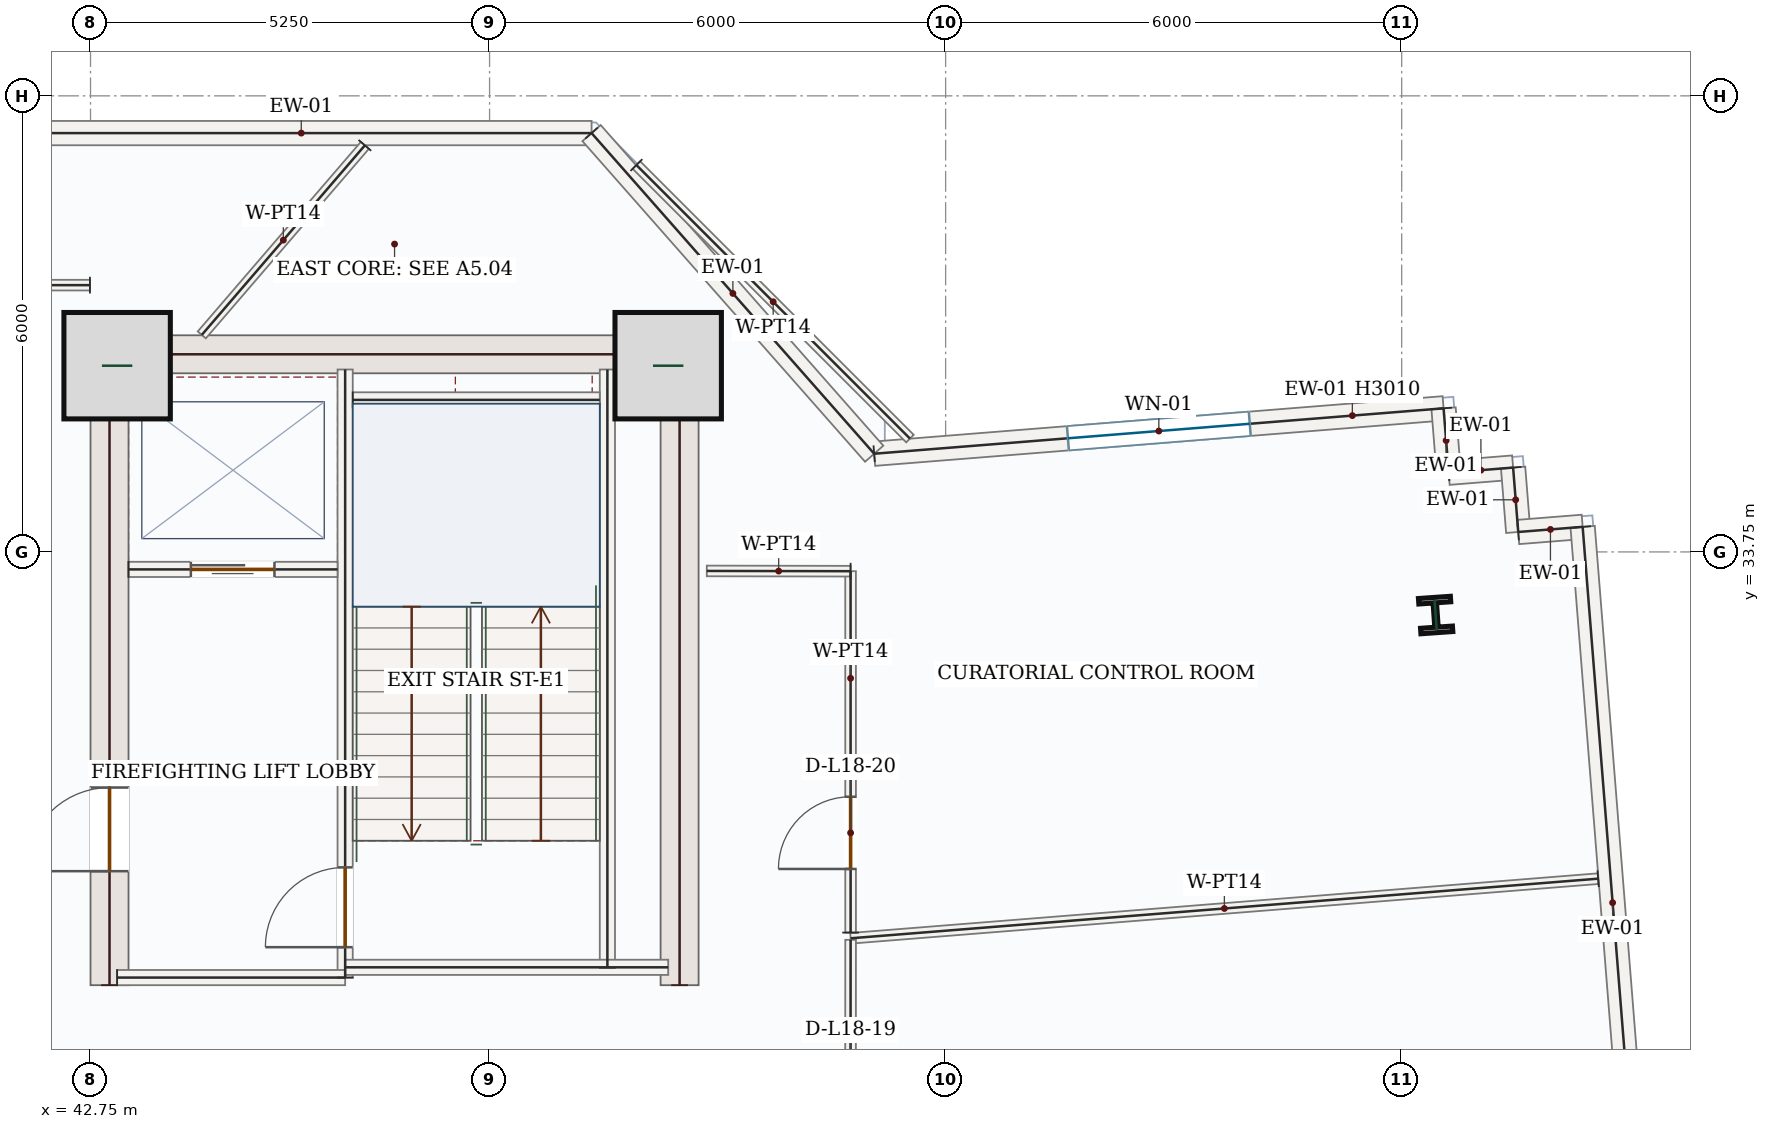
"""IFC4 building model, lengths in metres.
Left out: names, types, materials, properties, quantities, classifications, styles, units other than length and angle.
Written with IfcOpenShell. Run it as: python <this file> out.ifc"""

import sys

from ifc_helpers import new_model, si_unit, direction, frame, frame_2d, origin, origin_2d, place, context, subcontext, project, spatial, rectangle, i_section, extrude, source, transform, mapped, element, fill, save


model = new_model("IFC4")
c1 = context("Model", 3, precision=1e-05, world=origin(), true_north=direction((0.0, 1.0)))
c2 = subcontext(c1, "Body", "Model", "MODEL_VIEW")
j1 = project(units=[si_unit("LENGTHUNIT", "METRE"), si_unit("PLANEANGLEUNIT", "RADIAN")], contexts=[c1])
p1 = place(None, origin())
s1 = spatial("IfcSite", under=j1, at=p1, CompositionType="ELEMENT")
p2 = place(p1, origin())
s2 = spatial("IfcBuilding", under=s1, at=p2, CompositionType="ELEMENT")
p3 = place(p2, frame((0.0, 0.0, 83.7)))
s3 = spatial("IfcBuildingStorey", under=s2, at=p3, CompositionType="ELEMENT", Elevation=83.7)
p4 = place(p3, frame((43.0, 28.05, 0.0), z_axis=(0.0, 0.0, 1.0), x_axis=(0.0, 1.0, 0.0)))
e1 = element("IfcWall", 1, at=p4, inside=s3, PredefinedType="SHEAR", context=c2, shape_type="SweptSolid", body=[
    extrude(rectangle(XDim=8.55, YDim=0.5, at=frame_2d((4.275, 0.0))), origin(), (0.0, 0.0, 1.0), 3.95),
])
p5 = place(p4, frame((1.5, 0.0, 0.0)))
e2 = element("IfcOpeningElement", 2, at=p5, cuts=e1, PredefinedType="OPENING", context=c2, shape_type="SweptSolid", body=[
    extrude(rectangle(XDim=1.1, YDim=2.2, at=frame_2d((0.55, 1.1))), frame((0.0, 0.26, 0.0), z_axis=(0.0, -1.0, 0.0), x_axis=(1.0, 0.0, 0.0)), (0.0, 0.0, 1.0), 0.52),
])
m1 = source(origin(), c2, "Body", "SweptSolid", [
    extrude(rectangle(XDim=8.55, YDim=0.5, at=frame_2d((4.275, 0.0))), origin(), (0.0, 0.0, 1.0), 3.95),
])
p6 = place(p3, frame((50.5, 28.05, 0.0), z_axis=(0.0, 0.0, 1.0), x_axis=(0.0, 1.0, 0.0)))
e3 = element("IfcWall", 3, at=p6, inside=s3, PredefinedType="SHEAR", context=c2, shape_type="MappedRepresentation", body=[
    mapped(m1, transform((0.0, 0.0, 0.0), x_axis=(1.0, 0.0, 0.0), y_axis=(0.0, 1.0, 0.0), z_axis=(0.0, 0.0, 1.0), scale=1.0)),
])
m2 = source(origin(), c2, "Body", "SweptSolid", [
    extrude(rectangle(XDim=7.0, YDim=0.5, at=frame_2d((3.5, 0.0))), origin(), (0.0, 0.0, 1.0), 3.95),
])
p7 = place(p3, frame((43.25, 36.35, 0.0), z_axis=(0.0, 0.0, 1.0), x_axis=(1.0, 0.0, 0.0)))
e4 = element("IfcWall", 4, at=p7, inside=s3, PredefinedType="SHEAR", context=c2, shape_type="MappedRepresentation", body=[
    mapped(m2, transform((0.0, 0.0, 0.0), x_axis=(1.0, 0.0, 0.0), y_axis=(0.0, 1.0, 0.0), z_axis=(0.0, 0.0, 1.0), scale=1.0)),
])
m3 = source(origin(), c2, "Body", "SweptSolid", [
    extrude(rectangle(XDim=1.4, YDim=1.4, at=origin_2d()), origin(), (0.0, 0.0, 1.0), 4.2),
])
for number, where, z_axis, x_axis in (
    (5, (43.1, 36.2, 0.0), (0.0, 0.0, 1.0), (1.0, 0.0, 0.0)),
    (6, (50.35, 36.2, 0.0), (0.0, 0.0, 1.0), (1.0, 0.0, 0.0)),
):
    element("IfcColumn", number, at=place(p3, frame(where, z_axis=z_axis, x_axis=x_axis)), inside=s3, PredefinedType="COLUMN", context=c2, shape_type="MappedRepresentation", body=[
        mapped(m3, transform((0.0, 0.0, 0.0), x_axis=(1.0, 0.0, 0.0), y_axis=(0.0, 1.0, 0.0), z_axis=(0.0, 0.0, 1.0), scale=1.0)),
    ])
m4 = source(origin(), c2, "Body", "SweptSolid", [
    extrude(i_section(OverallWidth=0.421, OverallDepth=0.465, WebThickness=0.045, FlangeThickness=0.073, FilletRadius=0.018, at=origin_2d()), origin(), (0.0, 0.0, 1.0), 4.2),
])
p8 = place(p3, frame((60.447, 32.92, 0.0), z_axis=(0.0, 0.0, 1.0), x_axis=(0.99756405026, 0.069756473744, 0.0)))
e7 = element("IfcColumn", 7, at=p8, inside=s3, PredefinedType="COLUMN", context=c2, shape_type="MappedRepresentation", body=[
    mapped(m4, transform((0.0, 0.0, 0.0), x_axis=(1.0, 0.0, 0.0), y_axis=(0.0, 1.0, 0.0), z_axis=(0.0, 0.0, 1.0), scale=1.0)),
])
p9 = place(p3, frame((53.06, 35.042, 0.0), z_axis=(0.0, 0.0, 1.0), x_axis=(0.996834773193, 0.079501163223, 0.0)))
e8 = element("IfcWall", 8, at=p9, inside=s3, PredefinedType="SOLIDWALL", context=c2, shape_type="SweptSolid", body=[
    extrude(rectangle(XDim=7.514, YDim=0.32, at=frame_2d((3.757, 0.0))), origin(), (0.0, 0.0, 1.0), 3.01),
])
p10 = place(p9, frame((2.557, 0.0, 0.85)))
e9 = element("IfcOpeningElement", 9, at=p10, cuts=e8, PredefinedType="OPENING", context=c2, shape_type="SweptSolid", body=[
    extrude(rectangle(XDim=2.4, YDim=1.8, at=frame_2d((1.2, 0.9))), frame((0.0, 0.17, 0.0), z_axis=(0.0, -1.0, 0.0), x_axis=(1.0, 0.0, 0.0)), (0.0, 0.0, 1.0), 0.34),
])
m5 = source(origin(), c2, "Body", "SweptSolid", [
    extrude(rectangle(XDim=0.85, YDim=0.32, at=frame_2d((0.425, 0.0))), origin(), (0.0, 0.0, 1.0), 3.95),
])
p11 = place(p3, frame((60.551, 35.639, 0.0), z_axis=(0.0, 0.0, 1.0), x_axis=(0.079573954853, -0.996828965123, 0.0)))
e10 = element("IfcWall", 10, at=p11, inside=s3, PredefinedType="SOLIDWALL", context=c2, shape_type="MappedRepresentation", body=[
    mapped(m5, transform((0.0, 0.0, 0.0), x_axis=(1.0, 0.0, 0.0), y_axis=(0.0, 1.0, 0.0), z_axis=(0.0, 0.0, 1.0), scale=1.0)),
])
m6 = source(origin(), c2, "Body", "SweptSolid", [
    extrude(rectangle(XDim=0.85, YDim=0.32, at=frame_2d((0.425, 0.0))), origin(), (0.0, 0.0, 1.0), 3.95),
])
for number, where, z_axis, x_axis in (
    (11, (60.618, 34.792, 0.0), (0.0, 0.0, 1.0), (0.997, 0.08, 0.0)),
    (12, (61.466, 34.86, 0.0), (0.0, 0.0, 1.0), (0.08, -0.997, 0.0)),
):
    element("IfcWall", number, at=place(p3, frame(where, z_axis=z_axis, x_axis=x_axis)), inside=s3, PredefinedType="SOLIDWALL", context=c2, shape_type="MappedRepresentation", body=[
        mapped(m6, transform((0.0, 0.0, 0.0), x_axis=(1.0, 0.0, 0.0), y_axis=(0.0, 1.0, 0.0), z_axis=(0.0, 0.0, 1.0), scale=1.0)),
    ])
p12 = place(p3, frame((61.533, 34.012, 0.0), z_axis=(0.0, 0.0, 1.0), x_axis=(0.996851711541, 0.079288493483, 0.0)))
e13 = element("IfcWall", 13, at=p12, inside=s3, PredefinedType="SOLIDWALL", context=c2, shape_type="MappedRepresentation", body=[
    mapped(m5, transform((0.0, 0.0, 0.0), x_axis=(1.0, 0.0, 0.0), y_axis=(0.0, 1.0, 0.0), z_axis=(0.0, 0.0, 1.0), scale=1.0)),
])
m7 = source(origin(), c2, "Body", "SweptSolid", [
    extrude(rectangle(XDim=9.92, YDim=0.32, at=frame_2d((4.96, 0.0))), origin(), (0.0, 0.0, 1.0), 3.95),
])
p13 = place(p3, frame((62.381, 34.08, 0.0), z_axis=(0.0, 0.0, 1.0), x_axis=(0.07949480177, -0.996835280521, 0.0)))
e14 = element("IfcWall", 14, at=p13, inside=s3, PredefinedType="SOLIDWALL", context=c2, shape_type="MappedRepresentation", body=[
    mapped(m7, transform((0.0, 0.0, 0.0), x_axis=(1.0, 0.0, 0.0), y_axis=(0.0, 1.0, 0.0), z_axis=(0.0, 0.0, 1.0), scale=1.0)),
])
m8 = source(origin(), c2, "Body", "SweptSolid", [
    extrude(rectangle(XDim=7.639, YDim=0.32, at=frame_2d((3.819, 0.0))), origin(), (0.0, 0.0, 1.0), 3.95),
])
p14 = place(p3, frame((41.703, 39.26, 0.0), z_axis=(0.0, 0.0, 1.0), x_axis=(1.0, 0.0, 0.0)))
e15 = element("IfcWall", 15, at=p14, inside=s3, PredefinedType="SOLIDWALL", context=c2, shape_type="MappedRepresentation", body=[
    mapped(m8, transform((0.0, 0.0, 0.0), x_axis=(1.0, 0.0, 0.0), y_axis=(0.0, 1.0, 0.0), z_axis=(0.0, 0.0, 1.0), scale=1.0)),
])
m9 = source(origin(), c2, "Body", "SweptSolid", [
    extrude(rectangle(XDim=5.623, YDim=0.32, at=frame_2d((2.812, 0.0))), origin(), (0.0, 0.0, 1.0), 3.95),
])
p15 = place(p3, frame((49.342, 39.26, 0.0), z_axis=(0.0, 0.0, 1.0), x_axis=(0.66122376427, -0.750188731963, 0.0)))
e16 = element("IfcWall", 16, at=p15, inside=s3, PredefinedType="SOLIDWALL", context=c2, shape_type="MappedRepresentation", body=[
    mapped(m9, transform((0.0, 0.0, 0.0), x_axis=(1.0, 0.0, 0.0), y_axis=(0.0, 1.0, 0.0), z_axis=(0.0, 0.0, 1.0), scale=1.0)),
])
m10 = source(origin(), c2, "Body", "SweptSolid", [
    extrude(rectangle(XDim=7.87, YDim=0.2, at=frame_2d((3.935, 0.0))), origin(), (0.0, 0.0, 1.0), 3.95),
])
p16 = place(p3, frame((49.55, 28.28, 0.0), z_axis=(0.0, 0.0, 1.0), x_axis=(0.0, 1.0, 0.0)))
e17 = element("IfcWall", 17, at=p16, inside=s3, PredefinedType="SOLIDWALL", context=c2, shape_type="MappedRepresentation", body=[
    mapped(m10, transform((0.0, 0.0, 0.0), x_axis=(1.0, 0.0, 0.0), y_axis=(0.0, 1.0, 0.0), z_axis=(0.0, 0.0, 1.0), scale=1.0)),
])
p17 = place(p3, frame((46.1, 28.15, 0.0), z_axis=(0.0, 0.0, 1.0), x_axis=(0.0, 1.0, 0.0)))
e18 = element("IfcWall", 18, at=p17, inside=s3, PredefinedType="SOLIDWALL", context=c2, shape_type="SweptSolid", body=[
    extrude(rectangle(XDim=8.0, YDim=0.2, at=frame_2d((4.0, 0.0))), origin(), (0.0, 0.0, 1.0), 3.95),
])
p18 = place(p17, frame((0.4, 0.0, 0.0)))
e19 = element("IfcOpeningElement", 19, at=p18, cuts=e18, PredefinedType="OPENING", context=c2, shape_type="SweptSolid", body=[
    extrude(rectangle(XDim=1.05, YDim=2.15, at=frame_2d((0.525, 1.075))), frame((0.0, 0.11, 0.0), z_axis=(0.0, -1.0, 0.0), x_axis=(1.0, 0.0, 0.0)), (0.0, 0.0, 1.0), 0.22),
])
m11 = source(origin(), c2, "Body", "SweptSolid", [
    extrude(rectangle(XDim=3.0, YDim=0.2, at=frame_2d((1.5, 0.0))), origin(), (0.0, 0.0, 1.0), 3.95),
])
p19 = place(p3, frame((43.1, 28.15, 0.0), z_axis=(0.0, 0.0, 1.0), x_axis=(1.0, 0.0, 0.0)))
e20 = element("IfcWall", 20, at=p19, inside=s3, PredefinedType="SOLIDWALL", context=c2, shape_type="MappedRepresentation", body=[
    mapped(m11, transform((0.0, 0.0, 0.0), x_axis=(1.0, 0.0, 0.0), y_axis=(0.0, 1.0, 0.0), z_axis=(0.0, 0.0, 1.0), scale=1.0)),
])
m12 = source(origin(), c2, "Body", "SweptSolid", [
    extrude(rectangle(XDim=4.25, YDim=0.2, at=frame_2d((2.125, 0.0))), origin(), (0.0, 0.0, 1.0), 3.95),
])
p20 = place(p3, frame((46.1, 28.285, 0.0), z_axis=(0.0, 0.0, 1.0), x_axis=(1.0, 0.0, 0.0)))
e21 = element("IfcWall", 21, at=p20, inside=s3, PredefinedType="SOLIDWALL", context=c2, shape_type="MappedRepresentation", body=[
    mapped(m12, transform((0.0, 0.0, 0.0), x_axis=(1.0, 0.0, 0.0), y_axis=(0.0, 1.0, 0.0), z_axis=(0.0, 0.0, 1.0), scale=1.0)),
])
m13 = source(origin(), c2, "Body", "SweptSolid", [
    extrude(rectangle(XDim=3.25, YDim=0.2, at=frame_2d((1.625, 0.0))), origin(), (0.0, 0.0, 1.0), 3.95),
])
p21 = place(p3, frame((46.2, 35.75, 0.0), z_axis=(0.0, 0.0, 1.0), x_axis=(1.0, 0.0, 0.0)))
e22 = element("IfcWall", 22, at=p21, inside=s3, PredefinedType="SOLIDWALL", context=c2, shape_type="MappedRepresentation", body=[
    mapped(m13, transform((0.0, 0.0, 0.0), x_axis=(1.0, 0.0, 0.0), y_axis=(0.0, 1.0, 0.0), z_axis=(0.0, 0.0, 1.0), scale=1.0)),
])
p22 = place(p3, frame((43.25, 33.52, 0.0), z_axis=(0.0, 0.0, 1.0), x_axis=(1.0, 0.0, 0.0)))
e23 = element("IfcWall", 23, at=p22, inside=s3, PredefinedType="SOLIDWALL", context=c2, shape_type="SweptSolid", body=[
    extrude(rectangle(XDim=2.75, YDim=0.2, at=frame_2d((1.375, 0.0))), origin(), (0.0, 0.0, 1.0), 3.95),
])
p23 = place(p22, frame((0.82, 0.0, 0.0)))
e24 = element("IfcOpeningElement", 24, at=p23, cuts=e23, PredefinedType="OPENING", context=c2, shape_type="SweptSolid", body=[
    extrude(rectangle(XDim=1.1, YDim=2.15, at=frame_2d((0.55, 1.075))), frame((0.0, 0.11, 0.0), z_axis=(0.0, -1.0, 0.0), x_axis=(1.0, 0.0, 0.0)), (0.0, 0.0, 1.0), 0.22),
])
p24 = place(p3, frame((42.742, 37.26, 0.0), z_axis=(0.0, 0.0, 1.0), x_axis=(-0.999999998924, 4.6384341e-05, 0.0)))
e25 = element("IfcWall", 25, at=p24, inside=s3, PredefinedType="PARTITIONING", context=c2, shape_type="SweptSolid", body=[
    extrude(rectangle(XDim=5.263, YDim=0.14, at=frame_2d((2.632, 0.0))), origin(), (0.0, 0.0, 1.0), 3.95),
])
p25 = place(p24, frame((3.365, 0.0, 0.0)))
e26 = element("IfcOpeningElement", 26, at=p25, cuts=e25, PredefinedType="OPENING", context=c2, shape_type="SweptSolid", body=[
    extrude(rectangle(XDim=0.95, YDim=2.15, at=frame_2d((0.475, 1.075))), frame((0.0, 0.08, 0.0), z_axis=(0.0, -1.0, 0.0), x_axis=(1.0, 0.0, 0.0)), (0.0, 0.0, 1.0), 0.16),
])
m14 = source(origin(), c2, "Body", "SweptSolid", [
    extrude(rectangle(XDim=3.29, YDim=0.14, at=frame_2d((1.645, 0.0))), origin(), (0.0, 0.0, 1.0), 3.95),
])
p26 = place(p3, frame((46.36, 39.099, 0.0), z_axis=(0.0, 0.0, 1.0), x_axis=(-0.652214149627, -0.758034763732, 0.0)))
e27 = element("IfcWall", 27, at=p26, inside=s3, PredefinedType="PARTITIONING", context=c2, shape_type="MappedRepresentation", body=[
    mapped(m14, transform((0.0, 0.0, 0.0), x_axis=(1.0, 0.0, 0.0), y_axis=(0.0, 1.0, 0.0), z_axis=(0.0, 0.0, 1.0), scale=1.0)),
])
m15 = source(origin(), c2, "Body", "SweptSolid", [
    extrude(rectangle(XDim=5.09, YDim=0.14, at=frame_2d((2.545, 0.0))), origin(), (0.0, 0.0, 1.0), 3.95),
])
p27 = place(p3, frame((49.932, 38.84, 0.0), z_axis=(0.0, 0.0, 1.0), x_axis=(0.707106781187, -0.707106781187, 0.0)))
e28 = element("IfcWall", 28, at=p27, inside=s3, PredefinedType="PARTITIONING", context=c2, shape_type="MappedRepresentation", body=[
    mapped(m15, transform((0.0, 0.0, 0.0), x_axis=(1.0, 0.0, 0.0), y_axis=(0.0, 1.0, 0.0), z_axis=(0.0, 0.0, 1.0), scale=1.0)),
])
m16 = source(origin(), c2, "Body", "SweptSolid", [
    extrude(rectangle(XDim=9.865, YDim=0.14, at=frame_2d((4.933, 0.0))), origin(), (0.0, 0.0, 1.0), 3.95),
])
p28 = place(p3, frame((62.584, 29.451, 0.0), z_axis=(0.0, 0.0, 1.0), x_axis=(-0.996833900052, -0.079512110446, 0.0)))
e29 = element("IfcWall", 29, at=p28, inside=s3, PredefinedType="PARTITIONING", context=c2, shape_type="MappedRepresentation", body=[
    mapped(m16, transform((0.0, 0.0, 0.0), x_axis=(1.0, 0.0, 0.0), y_axis=(0.0, 1.0, 0.0), z_axis=(0.0, 0.0, 1.0), scale=1.0)),
])
p29 = place(p3, frame((52.75, 28.742, 0.0), z_axis=(0.0, 0.0, 1.0), x_axis=(-0.000102701037, 0.999999994726, 0.0)))
e30 = element("IfcWall", 30, at=p29, inside=s3, PredefinedType="PARTITIONING", context=c2, shape_type="SweptSolid", body=[
    extrude(rectangle(XDim=4.754, YDim=0.14, at=frame_2d((2.377, 0.0))), origin(), (0.0, 0.0, 1.0), 3.95),
])
p30 = place(p29, frame((0.837, 0.0, 0.0)))
e31 = element("IfcOpeningElement", 31, at=p30, cuts=e30, PredefinedType="OPENING", context=c2, shape_type="SweptSolid", body=[
    extrude(rectangle(XDim=0.95, YDim=2.15, at=frame_2d((0.475, 1.075))), frame((0.0, 0.08, 0.0), z_axis=(0.0, -1.0, 0.0), x_axis=(1.0, 0.0, 0.0)), (0.0, 0.0, 1.0), 0.16),
])
m17 = source(origin(), c2, "Body", "SweptSolid", [
    extrude(rectangle(XDim=1.892, YDim=0.14, at=frame_2d((0.946, 0.0))), origin(), (0.0, 0.0, 1.0), 3.95),
])
p31 = place(p3, frame((52.75, 33.497, 0.0), z_axis=(0.0, 0.0, 1.0), x_axis=(-0.999998592772, 0.001677633463, 0.0)))
e32 = element("IfcWall", 32, at=p31, inside=s3, PredefinedType="PARTITIONING", context=c2, shape_type="MappedRepresentation", body=[
    mapped(m17, transform((0.0, 0.0, 0.0), x_axis=(1.0, 0.0, 0.0), y_axis=(0.0, 1.0, 0.0), z_axis=(0.0, 0.0, 1.0), scale=1.0)),
])
p32 = place(p3, frame((52.745, 20.576, 0.0), z_axis=(0.0, 0.0, 1.0), x_axis=(0.000604997167, 0.999999816989, 0.0)))
e33 = element("IfcWall", 33, at=p32, inside=s3, PredefinedType="PARTITIONING", context=c2, shape_type="SweptSolid", body=[
    extrude(rectangle(XDim=8.071, YDim=0.14, at=frame_2d((4.035, 0.0))), origin(), (0.0, 0.0, 1.0), 3.95),
])
p33 = place(p32, frame((5.554, 0.0, 0.0)))
e34 = element("IfcOpeningElement", 34, at=p33, cuts=e33, PredefinedType="OPENING", context=c2, shape_type="SweptSolid", body=[
    extrude(rectangle(XDim=0.95, YDim=2.15, at=frame_2d((0.475, 1.075))), frame((0.0, 0.08, 0.0), z_axis=(0.0, -1.0, 0.0), x_axis=(1.0, 0.0, 0.0)), (0.0, 0.0, 1.0), 0.16),
])
m18 = source(origin(), c2, "Body", "SweptSolid", [
    extrude(rectangle(XDim=2.4, YDim=1.8, at=frame_2d((1.2, 0.9))), frame((0.0, 0.03, 0.0), z_axis=(0.0, -1.0, 0.0), x_axis=(1.0, 0.0, 0.0)), (0.0, 0.0, 1.0), 0.06),
])
p34 = place(p10, origin())
e35 = element("IfcWindow", 35, at=p34, inside=s3, PartitioningType="DOUBLE_PANEL_VERTICAL", PredefinedType="WINDOW", context=c2, shape_type="MappedRepresentation", body=[
    mapped(m18, transform((0.0, 0.0, 0.0), x_axis=(1.0, 0.0, 0.0), y_axis=(0.0, 1.0, 0.0), z_axis=(0.0, 0.0, 1.0), scale=1.0)),
])
fill(e9, e35)
m19 = source(origin(), c2, "Body", "SweptSolid", [
    extrude(rectangle(XDim=1.05, YDim=2.15, at=frame_2d((0.525, 1.075))), frame((0.0, 0.025, 0.0), z_axis=(0.0, -1.0, 0.0), x_axis=(1.0, 0.0, 0.0)), (0.0, 0.0, 1.0), 0.05),
])
p35 = place(p18, origin())
e36 = element("IfcDoor", 36, at=p35, inside=s3, OperationType="SINGLE_SWING_LEFT", PredefinedType="DOOR", context=c2, shape_type="MappedRepresentation", body=[
    mapped(m19, transform((0.0, 0.0, 0.0), x_axis=(1.0, 0.0, 0.0), y_axis=(0.0, 1.0, 0.0), z_axis=(0.0, 0.0, 1.0), scale=1.0)),
])
fill(e19, e36)
m20 = source(origin(), c2, "Body", "SweptSolid", [
    extrude(rectangle(XDim=1.1, YDim=2.15, at=frame_2d((0.55, 1.075))), frame((0.0, 0.025, 0.0), z_axis=(0.0, -1.0, 0.0), x_axis=(1.0, 0.0, 0.0)), (0.0, 0.0, 1.0), 0.05),
])
p36 = place(p23, origin())
e37 = element("IfcDoor", 37, at=p36, inside=s3, OperationType="DOUBLE_DOOR_SLIDING", PredefinedType="DOOR", context=c2, shape_type="MappedRepresentation", body=[
    mapped(m20, transform((0.0, 0.0, 0.0), x_axis=(1.0, 0.0, 0.0), y_axis=(0.0, 1.0, 0.0), z_axis=(0.0, 0.0, 1.0), scale=1.0)),
])
fill(e24, e37)
m21 = source(origin(), c2, "Body", "SweptSolid", [
    extrude(rectangle(XDim=1.1, YDim=2.2, at=frame_2d((0.55, 1.1))), frame((0.0, 0.025, 0.0), z_axis=(0.0, -1.0, 0.0), x_axis=(1.0, 0.0, 0.0)), (0.0, 0.0, 1.0), 0.05),
])
p37 = place(p5, origin())
e38 = element("IfcDoor", 38, at=p37, inside=s3, OperationType="SINGLE_SWING_LEFT", PredefinedType="DOOR", context=c2, shape_type="MappedRepresentation", body=[
    mapped(m21, transform((0.0, 0.0, 0.0), x_axis=(1.0, 0.0, 0.0), y_axis=(0.0, 1.0, 0.0), z_axis=(0.0, 0.0, 1.0), scale=1.0)),
])
fill(e2, e38)
m22 = source(origin(), c2, "Body", "SweptSolid", [
    extrude(rectangle(XDim=0.95, YDim=2.15, at=frame_2d((0.475, 1.075))), frame((0.0, 0.025, 0.0), z_axis=(0.0, -1.0, 0.0), x_axis=(1.0, 0.0, 0.0)), (0.0, 0.0, 1.0), 0.05),
])
p38 = place(p30, origin())
e39 = element("IfcDoor", 39, at=p38, inside=s3, OperationType="SINGLE_SWING_LEFT", PredefinedType="DOOR", context=c2, shape_type="MappedRepresentation", body=[
    mapped(m22, transform((0.0, 0.0, 0.0), x_axis=(1.0, 0.0, 0.0), y_axis=(0.0, 1.0, 0.0), z_axis=(0.0, 0.0, 1.0), scale=1.0)),
])
fill(e31, e39)
save(model, sys.argv[1])
